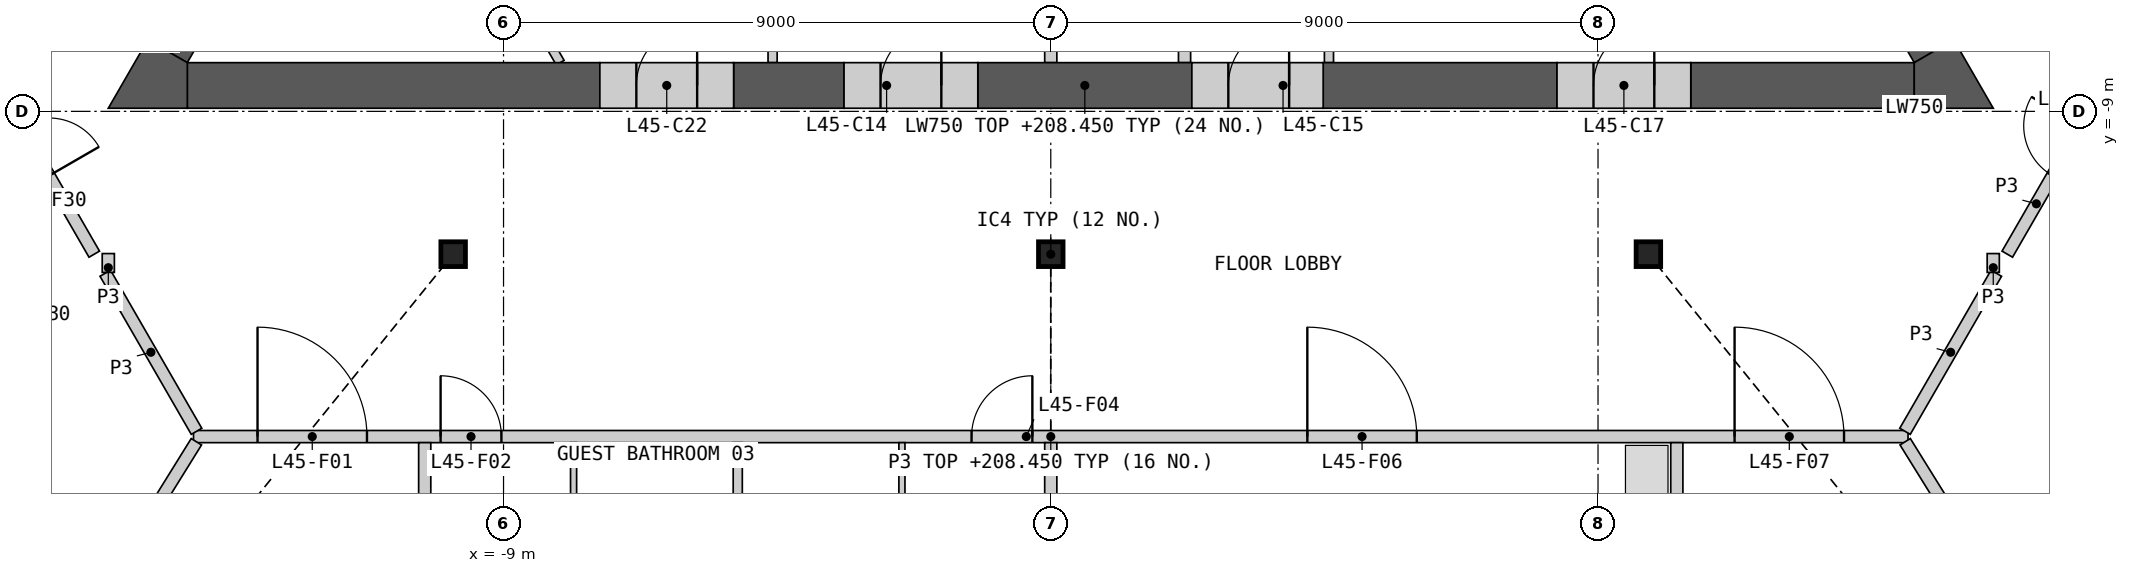
"""IFC4 building model, lengths in metres.
Left out: names, types, materials, properties, quantities, classifications, styles, units other than length and angle.
Written with IfcOpenShell. Run it as: python <this file> out.ifc"""

import sys

from ifc_helpers import new_model, si_unit, direction, frame, frame_2d, origin, origin_2d, place, context, subcontext, project, spatial, polyline, rectangle, i_section, outline, extrude, element, fill, save


model = new_model("IFC4")
c1 = context("Model", 3, precision=1e-05, world=origin(), true_north=direction((0.0, 1.0)))
c2 = subcontext(c1, "Body", "Model", "MODEL_VIEW")
j1 = project(units=[si_unit("LENGTHUNIT", "METRE"), si_unit("PLANEANGLEUNIT", "RADIAN")], contexts=[c1])
p1 = place(None, origin())
s1 = spatial("IfcSite", under=j1, at=p1, CompositionType="ELEMENT")
p2 = place(p1, origin())
s2 = spatial("IfcBuilding", under=s1, at=p2, CompositionType="ELEMENT")
p3 = place(p2, frame((0.0, 0.0, 205.2)))
s3 = spatial("IfcBuildingStorey", under=s2, at=p3, CompositionType="ELEMENT", Elevation=205.2)
for number, where, z_axis, x_axis in (
    (1, (-9.828, -11.349, 0.0), (0.0, 0.0, 1.0), (1.0, 0.0, 0.0)),
    (2, (0.0, -11.349, 0.0), (0.0, 0.0, 1.0), (1.0, 0.0, 0.0)),
    (3, (9.828, -11.349, 0.0), (0.0, 0.0, 1.0), (1.0, 0.0, 0.0)),
):
    element("IfcColumn", number, at=place(p3, frame(where, z_axis=z_axis, x_axis=x_axis)), inside=s3, PredefinedType="COLUMN", context=c2, shape_type="SweptSolid", body=[
        extrude(i_section(OverallWidth=0.404, OverallDepth=0.407, WebThickness=0.027, FlangeThickness=0.044, at=origin_2d()), origin(), (0.0, 0.0, 1.0), 3.6),
    ])
for number, where, z_axis, x_axis in (
    (4, (0.0, -6.906, 0.0), (0.0, 0.0, 1.0), (0.0, -1.0, 0.0)),
    (5, (2.2, -6.906, 0.0), (0.0, 0.0, 1.0), (0.0, -1.0, 0.0)),
):
    element("IfcWall", number, at=place(p3, frame(where, z_axis=z_axis, x_axis=x_axis)), inside=s3, PredefinedType="SHEAR", context=c2, shape_type="SweptSolid", body=[
        extrude(rectangle(XDim=1.293, YDim=0.2, at=frame_2d((0.646, 0.0))), origin(), (0.0, 0.0, 1.0), 3.25),
    ])
for number, where, z_axis, x_axis in (
    (6, (4.575, -6.906, 0.0), (0.0, 0.0, 1.0), (0.0, -1.0, 0.0)),
    (7, (-4.575, -6.906, 0.0), (0.0, 0.0, 1.0), (0.0, -1.0, 0.0)),
):
    element("IfcWall", number, at=place(p3, frame(where, z_axis=z_axis, x_axis=x_axis)), inside=s3, PredefinedType="PARTITIONING", context=c2, shape_type="SweptSolid", body=[
        extrude(rectangle(XDim=1.293, YDim=0.15, at=frame_2d((0.646, 0.0))), origin(), (0.0, 0.0, 1.0), 3.25),
    ])
p4 = place(p3, frame((-8.83, -6.881, 0.0), z_axis=(0.0, 0.0, 1.0), x_axis=(0.500037110984, -0.866003976688, 0.0)))
e8 = element("IfcWall", 8, at=p4, inside=s3, PredefinedType="PARTITIONING", context=c2, shape_type="SweptSolid", body=[
    extrude(rectangle(XDim=1.522, YDim=0.15, at=frame_2d((0.761, 0.0))), origin(), (0.0, 0.0, 1.0), 3.25),
])
p5 = place(p3, frame((-14.201, -8.574, 0.0), z_axis=(0.0, 0.0, 1.0), x_axis=(1.0, 0.0, 0.0)))
e9 = element("IfcWall", 9, at=p5, inside=s3, PredefinedType="SHEAR", context=c2, shape_type="SweptSolid", body=[
    extrude(rectangle(XDim=6.785, YDim=0.75, at=frame_2d((3.393, 0.0))), origin(), (0.0, 0.0, 1.0), 3.25),
])
p6 = place(p3, frame((4.48, -8.574, 0.0), z_axis=(0.0, 0.0, 1.0), x_axis=(1.0, 0.0, 0.0)))
e10 = element("IfcWall", 10, at=p6, inside=s3, PredefinedType="SHEAR", context=c2, shape_type="SweptSolid", body=[
    extrude(rectangle(XDim=3.845, YDim=0.75, at=frame_2d((1.923, 0.0))), origin(), (0.0, 0.0, 1.0), 3.25),
])
p7 = place(p3, frame((10.525, -8.574, 0.0), z_axis=(0.0, 0.0, 1.0), x_axis=(1.0, 0.0, 0.0)))
e11 = element("IfcWall", 11, at=p7, inside=s3, PredefinedType="SHEAR", context=c2, shape_type="SweptSolid", body=[
    extrude(rectangle(XDim=3.676, YDim=0.75, at=frame_2d((1.838, 0.0))), origin(), (0.0, 0.0, 1.0), 3.25),
])
p8 = place(p3, frame((-1.2, -8.574, 0.0), z_axis=(0.0, 0.0, 1.0), x_axis=(1.0, 0.0, 0.0)))
e12 = element("IfcWall", 12, at=p8, inside=s3, PredefinedType="SHEAR", context=c2, shape_type="SweptSolid", body=[
    extrude(rectangle(XDim=3.52, YDim=0.75, at=frame_2d((1.76, 0.0))), origin(), (0.0, 0.0, 1.0), 3.25),
])
p9 = place(p3, frame((-5.216, -8.574, 0.0), z_axis=(0.0, 0.0, 1.0), x_axis=(1.0, 0.0, 0.0)))
e13 = element("IfcWall", 13, at=p9, inside=s3, PredefinedType="SHEAR", context=c2, shape_type="SweptSolid", body=[
    extrude(rectangle(XDim=1.816, YDim=0.75, at=frame_2d((0.908, 0.0))), origin(), (0.0, 0.0, 1.0), 3.25),
])
p10 = place(p3, frame((14.526, -8.011, 0.0), z_axis=(0.0, 0.0, 1.0), x_axis=(-0.499996012963, 0.866027705689, 0.0)))
e14 = element("IfcWall", 14, at=p10, inside=s3, PredefinedType="SHEAR", context=c2, shape_type="SweptSolid", body=[
    extrude(rectangle(XDim=15.039, YDim=0.75, at=frame_2d((7.519, 0.0))), origin(), (0.0, 0.0, 1.0), 3.25),
])
p11 = place(p3, frame((-13.564, -6.346, 0.0), z_axis=(0.0, 0.0, 1.0), x_axis=(-0.499989888488, -0.86603124159, 0.0)))
e15 = element("IfcWall", 15, at=p11, inside=s3, PredefinedType="SHEAR", context=c2, shape_type="SweptSolid", body=[
    extrude(rectangle(XDim=1.923, YDim=0.75, at=frame_2d((0.961, 0.0))), origin(), (0.0, 0.0, 1.0), 3.25),
])
p12 = place(p3, origin())
e16 = element("IfcWall", 16, at=p12, inside=s3, PredefinedType="SHEAR", context=c2, shape_type="SweptSolid", body=[
    extrude(outline(polyline([(14.201, -8.949), (14.201, -8.199), (14.851, -7.824), (15.5, -8.949), (14.201, -8.949)])), origin(), (0.0, 0.0, 1.0), 3.25),
])
p13 = place(p3, origin())
e17 = element("IfcWall", 17, at=p13, inside=s3, PredefinedType="SHEAR", context=c2, shape_type="SweptSolid", body=[
    extrude(outline(polyline([(-14.851, -7.824), (-14.201, -8.199), (-14.201, -8.949), (-15.5, -8.949), (-14.851, -7.824)])), origin(), (0.0, 0.0, 1.0), 3.25),
])
p14 = place(p3, frame((-3.4, -8.574, 0.0), z_axis=(0.0, 0.0, 1.0), x_axis=(1.0, 0.0, 0.0)))
e18 = element("IfcWall", 18, at=p14, inside=s3, PredefinedType="SHEAR", context=c2, shape_type="SweptSolid", body=[
    extrude(rectangle(XDim=2.2, YDim=0.75, at=frame_2d((1.1, 0.0))), origin(), (0.0, 0.0, 1.0), 3.25),
])
p15 = place(p14, frame((0.6, 0.0, 0.0)))
e19 = element("IfcOpeningElement", 19, at=p15, cuts=e18, PredefinedType="OPENING", context=c2, shape_type="SweptSolid", body=[
    extrude(rectangle(XDim=1.0, YDim=2.1, at=frame_2d((0.5, 1.05))), frame((0.0, 0.385, 0.0), z_axis=(0.0, -1.0, 0.0), x_axis=(1.0, 0.0, 0.0)), (0.0, 0.0, 1.0), 0.77),
])
p16 = place(p3, frame((2.32, -8.574, 0.0), z_axis=(0.0, 0.0, 1.0), x_axis=(1.0, 0.0, 0.0)))
e20 = element("IfcWall", 20, at=p16, inside=s3, PredefinedType="SHEAR", context=c2, shape_type="SweptSolid", body=[
    extrude(rectangle(XDim=2.16, YDim=0.75, at=frame_2d((1.08, 0.0))), origin(), (0.0, 0.0, 1.0), 3.25),
])
p17 = place(p16, frame((0.6, 0.0, 0.0)))
e21 = element("IfcOpeningElement", 21, at=p17, cuts=e20, PredefinedType="OPENING", context=c2, shape_type="SweptSolid", body=[
    extrude(rectangle(XDim=1.0, YDim=2.1, at=frame_2d((0.5, 1.05))), frame((0.0, 0.385, 0.0), z_axis=(0.0, -1.0, 0.0), x_axis=(1.0, 0.0, 0.0)), (0.0, 0.0, 1.0), 0.77),
])
p18 = place(p3, frame((8.325, -8.574, 0.0), z_axis=(0.0, 0.0, 1.0), x_axis=(1.0, 0.0, 0.0)))
e22 = element("IfcWall", 22, at=p18, inside=s3, PredefinedType="SHEAR", context=c2, shape_type="SweptSolid", body=[
    extrude(rectangle(XDim=2.2, YDim=0.75, at=frame_2d((1.1, 0.0))), origin(), (0.0, 0.0, 1.0), 3.25),
])
p19 = place(p18, frame((0.6, 0.0, 0.0)))
e23 = element("IfcOpeningElement", 23, at=p19, cuts=e22, PredefinedType="OPENING", context=c2, shape_type="SweptSolid", body=[
    extrude(rectangle(XDim=1.0, YDim=2.1, at=frame_2d((0.5, 1.05))), frame((0.0, 0.385, 0.0), z_axis=(0.0, -1.0, 0.0), x_axis=(1.0, 0.0, 0.0)), (0.0, 0.0, 1.0), 0.77),
])
p20 = place(p3, frame((-7.416, -8.574, 0.0), z_axis=(0.0, 0.0, 1.0), x_axis=(1.0, 0.0, 0.0)))
e24 = element("IfcWall", 24, at=p20, inside=s3, PredefinedType="SHEAR", context=c2, shape_type="SweptSolid", body=[
    extrude(rectangle(XDim=2.2, YDim=0.75, at=frame_2d((1.1, 0.0))), origin(), (0.0, 0.0, 1.0), 3.25),
])
p21 = place(p20, frame((0.6, 0.0, 0.0)))
e25 = element("IfcOpeningElement", 25, at=p21, cuts=e24, PredefinedType="OPENING", context=c2, shape_type="SweptSolid", body=[
    extrude(rectangle(XDim=1.0, YDim=2.1, at=frame_2d((0.5, 1.05))), frame((0.0, 0.385, 0.0), z_axis=(0.0, -1.0, 0.0), x_axis=(1.0, 0.0, 0.0)), (0.0, 0.0, 1.0), 0.77),
])
p22 = place(p3, frame((-14.099, -14.349, 0.0), z_axis=(0.0, 0.0, 1.0), x_axis=(1.0, 0.0, 0.0)))
e26 = element("IfcWall", 26, at=p22, inside=s3, PredefinedType="PARTITIONING", context=c2, shape_type="SweptSolid", body=[
    extrude(rectangle(XDim=28.198, YDim=0.2, at=frame_2d((14.099, 0.0))), origin(), (0.0, 0.0, 1.0), 3.25),
])
p23 = place(p22, frame((1.053, 0.0, 0.0)))
e27 = element("IfcOpeningElement", 27, at=p23, cuts=e26, PredefinedType="OPENING", context=c2, shape_type="SweptSolid", body=[
    extrude(rectangle(XDim=1.8, YDim=2.1, at=frame_2d((0.9, 1.05))), frame((0.0, 0.11, 0.0), z_axis=(0.0, -1.0, 0.0), x_axis=(1.0, 0.0, 0.0)), (0.0, 0.0, 1.0), 0.22),
])
p24 = place(p22, frame((4.064, 0.0, 0.0)))
e28 = element("IfcOpeningElement", 28, at=p24, cuts=e26, PredefinedType="OPENING", context=c2, shape_type="SweptSolid", body=[
    extrude(rectangle(XDim=1.0, YDim=2.1, at=frame_2d((0.5, 1.05))), frame((0.0, 0.11, 0.0), z_axis=(0.0, -1.0, 0.0), x_axis=(1.0, 0.0, 0.0)), (0.0, 0.0, 1.0), 0.22),
])
p25 = place(p22, frame((12.796, 0.0, 0.0)))
e29 = element("IfcOpeningElement", 29, at=p25, cuts=e26, PredefinedType="OPENING", context=c2, shape_type="SweptSolid", body=[
    extrude(rectangle(XDim=1.0, YDim=2.1, at=frame_2d((0.5, 1.05))), frame((0.0, 0.11, 0.0), z_axis=(0.0, -1.0, 0.0), x_axis=(1.0, 0.0, 0.0)), (0.0, 0.0, 1.0), 0.22),
])
p26 = place(p22, frame((18.318, 0.0, 0.0)))
e30 = element("IfcOpeningElement", 30, at=p26, cuts=e26, PredefinedType="OPENING", context=c2, shape_type="SweptSolid", body=[
    extrude(rectangle(XDim=1.8, YDim=2.1, at=frame_2d((0.9, 1.05))), frame((0.0, 0.11, 0.0), z_axis=(0.0, -1.0, 0.0), x_axis=(1.0, 0.0, 0.0)), (0.0, 0.0, 1.0), 0.22),
])
p27 = place(p22, frame((25.345, 0.0, 0.0)))
e31 = element("IfcOpeningElement", 31, at=p27, cuts=e26, PredefinedType="OPENING", context=c2, shape_type="SweptSolid", body=[
    extrude(rectangle(XDim=1.8, YDim=2.1, at=frame_2d((0.9, 1.05))), frame((0.0, 0.11, 0.0), z_axis=(0.0, -1.0, 0.0), x_axis=(1.0, 0.0, 0.0)), (0.0, 0.0, 1.0), 0.22),
])
p28 = place(p3, frame((14.971, -3.233, 0.0), z_axis=(0.0, 0.0, 1.0), x_axis=(0.500003221507, -0.866023543838, 0.0)))
e32 = element("IfcWall", 32, at=p28, inside=s3, PredefinedType="PARTITIONING", context=c2, shape_type="SweptSolid", body=[
    extrude(rectangle(XDim=5.545, YDim=0.2, at=frame_2d((2.772, 0.0))), origin(), (0.0, 0.0, 1.0), 3.25),
])
p29 = place(p28, frame((4.094, 0.0, 0.0)))
e33 = element("IfcOpeningElement", 33, at=p29, cuts=e32, PredefinedType="OPENING", context=c2, shape_type="SweptSolid", body=[
    extrude(rectangle(XDim=1.1, YDim=2.1, at=frame_2d((0.55, 1.05))), frame((0.0, 0.11, 0.0), z_axis=(0.0, -1.0, 0.0), x_axis=(1.0, 0.0, 0.0)), (0.0, 0.0, 1.0), 0.22),
])
p30 = place(p3, frame((-17.744, -8.035, 0.0), z_axis=(0.0, 0.0, 1.0), x_axis=(0.500003221507, 0.866023543838, 0.0)))
e34 = element("IfcWall", 34, at=p30, inside=s3, PredefinedType="PARTITIONING", context=c2, shape_type="SweptSolid", body=[
    extrude(rectangle(XDim=5.545, YDim=0.2, at=frame_2d((2.772, 0.0))), origin(), (0.0, 0.0, 1.0), 3.25),
])
p31 = place(p30, frame((0.351, 0.0, 0.0)))
e35 = element("IfcOpeningElement", 35, at=p31, cuts=e34, PredefinedType="OPENING", context=c2, shape_type="SweptSolid", body=[
    extrude(rectangle(XDim=1.1, YDim=2.1, at=frame_2d((0.55, 1.05))), frame((0.0, 0.11, 0.0), z_axis=(0.0, -1.0, 0.0), x_axis=(1.0, 0.0, 0.0)), (0.0, 0.0, 1.0), 0.22),
])
p32 = place(p3, frame((15.731, -11.349, 0.0), z_axis=(0.0, 0.0, 1.0), x_axis=(0.499961815444, 0.866047448526, 0.0)))
e36 = element("IfcWall", 36, at=p32, inside=s3, PredefinedType="PARTITIONING", context=c2, shape_type="SweptSolid", body=[
    extrude(rectangle(XDim=3.826, YDim=0.2, at=frame_2d((1.913, 0.0))), origin(), (0.0, 0.0, 1.0), 3.25),
])
p33 = place(p32, frame((1.49, 0.0, 0.0)))
e37 = element("IfcOpeningElement", 37, at=p33, cuts=e36, PredefinedType="OPENING", context=c2, shape_type="SweptSolid", body=[
    extrude(rectangle(XDim=0.95, YDim=2.1, at=frame_2d((0.475, 1.05))), frame((0.0, 0.11, 0.0), z_axis=(0.0, -1.0, 0.0), x_axis=(1.0, 0.0, 0.0)), (0.0, 0.0, 1.0), 0.22),
])
p34 = place(p3, frame((-17.644, -8.035, 0.0), z_axis=(0.0, 0.0, 1.0), x_axis=(0.499961815444, -0.866047448526, 0.0)))
e38 = element("IfcWall", 38, at=p34, inside=s3, PredefinedType="PARTITIONING", context=c2, shape_type="SweptSolid", body=[
    extrude(rectangle(XDim=3.826, YDim=0.2, at=frame_2d((1.913, 0.0))), origin(), (0.0, 0.0, 1.0), 3.25),
])
p35 = place(p34, frame((1.386, 0.0, 0.0)))
e39 = element("IfcOpeningElement", 39, at=p35, cuts=e38, PredefinedType="OPENING", context=c2, shape_type="SweptSolid", body=[
    extrude(rectangle(XDim=0.95, YDim=2.1, at=frame_2d((0.475, 1.05))), frame((0.0, 0.11, 0.0), z_axis=(0.0, -1.0, 0.0), x_axis=(1.0, 0.0, 0.0)), (0.0, 0.0, 1.0), 0.22),
])
for number, where, z_axis, x_axis in (
    (40, (14.049, -14.262, 0.0), (0.0, 0.0, 1.0), (0.5, 0.866, 0.0)),
    (41, (-15.55, -11.662, 0.0), (0.0, 0.0, 1.0), (0.5, -0.866, 0.0)),
):
    element("IfcWall", number, at=place(p3, frame(where, z_axis=z_axis, x_axis=x_axis)), inside=s3, PredefinedType="PARTITIONING", context=c2, shape_type="SweptSolid", body=[
        extrude(rectangle(XDim=3.002, YDim=0.2, at=frame_2d((1.501, 0.0))), origin(), (0.0, 0.0, 1.0), 3.25),
    ])
for number, where, z_axis, x_axis in (
    (42, (-15.5, -11.649, 0.0), (0.0, 0.0, 1.0), (0.0, 1.0, 0.0)),
    (43, (15.5, -11.649, 0.0), (0.0, 0.0, 1.0), (0.0, 1.0, 0.0)),
):
    element("IfcWall", number, at=place(p3, frame(where, z_axis=z_axis, x_axis=x_axis)), inside=s3, PredefinedType="PARTITIONING", context=c2, shape_type="SweptSolid", body=[
        extrude(rectangle(XDim=0.31, YDim=0.2, at=frame_2d((0.155, 0.0))), origin(), (0.0, 0.0, 1.0), 3.25),
    ])
p36 = place(p3, frame((14.052, -14.434, 0.0), z_axis=(0.0, 0.0, 1.0), x_axis=(0.527581174538, -0.849504622868, 0.0)))
e44 = element("IfcWall", 44, at=p36, inside=s3, PredefinedType="PARTITIONING", context=c2, shape_type="SweptSolid", body=[
    extrude(rectangle(XDim=11.747, YDim=0.2, at=frame_2d((5.873, 0.0))), origin(), (0.0, 0.0, 1.0), 2.404),
])
p37 = place(p3, frame((-20.117, -24.2, 0.0), z_axis=(0.0, 0.0, 1.0), x_axis=(0.527576403825, 0.849507585679, 0.0)))
e45 = element("IfcWall", 45, at=p37, inside=s3, PredefinedType="PARTITIONING", context=c2, shape_type="SweptSolid", body=[
    extrude(rectangle(XDim=11.497, YDim=0.2, at=frame_2d((5.749, 0.0))), origin(), (0.0, 0.0, 1.0), 2.404),
])
for number, where, z_axis, x_axis in (
    (46, (-10.296, -24.312, 0.0), (0.0, 0.0, 1.0), (0.0, 1.0, 0.0)),
    (47, (0.0, -24.312, 0.0), (0.0, 0.0, 1.0), (0.0, 1.0, 0.0)),
    (48, (10.296, -24.312, 0.0), (0.0, 0.0, 1.0), (0.0, 1.0, 0.0)),
):
    element("IfcWall", number, at=place(p3, frame(where, z_axis=z_axis, x_axis=x_axis)), inside=s3, PredefinedType="PARTITIONING", context=c2, shape_type="SweptSolid", body=[
        extrude(rectangle(XDim=9.863, YDim=0.2, at=frame_2d((4.931, 0.0))), origin(), (0.0, 0.0, 1.0), 2.404),
    ])
p38 = place(p3, frame((-19.822, -11.562, 0.0), z_axis=(0.0, 0.0, 1.0), x_axis=(0.500008997517, -0.866020209003, 0.0)))
e49 = element("IfcWall", 49, at=p38, inside=s3, PredefinedType="PARTITIONING", context=c2, shape_type="SweptSolid", body=[
    extrude(rectangle(XDim=7.178, YDim=0.2, at=frame_2d((3.589, 0.0))), origin(), (0.0, 0.0, 1.0), 2.404),
])
p39 = place(p38, frame((2.059, 0.0, 0.0)))
e50 = element("IfcOpeningElement", 50, at=p39, cuts=e49, PredefinedType="OPENING", context=c2, shape_type="SweptSolid", body=[
    extrude(rectangle(XDim=0.95, YDim=2.1, at=frame_2d((0.475, 1.05))), frame((0.0, 0.11, 0.0), z_axis=(0.0, -1.0, 0.0), x_axis=(1.0, 0.0, 0.0)), (0.0, 0.0, 1.0), 0.22),
])
p40 = place(p3, frame((16.233, -17.779, 0.0), z_axis=(0.0, 0.0, 1.0), x_axis=(0.500008997517, 0.866020209003, 0.0)))
e51 = element("IfcWall", 51, at=p40, inside=s3, PredefinedType="PARTITIONING", context=c2, shape_type="SweptSolid", body=[
    extrude(rectangle(XDim=7.178, YDim=0.2, at=frame_2d((3.589, 0.0))), origin(), (0.0, 0.0, 1.0), 2.404),
])
p41 = place(p40, frame((4.973, 0.0, 0.0)))
e52 = element("IfcOpeningElement", 52, at=p41, cuts=e51, PredefinedType="OPENING", context=c2, shape_type="SweptSolid", body=[
    extrude(rectangle(XDim=0.95, YDim=2.1, at=frame_2d((0.475, 1.05))), frame((0.0, 0.11, 0.0), z_axis=(0.0, -1.0, 0.0), x_axis=(1.0, 0.0, 0.0)), (0.0, 0.0, 1.0), 0.22),
])
p42 = place(p3, frame((-5.148, -16.899, 0.0), z_axis=(0.0, 0.0, 1.0), x_axis=(0.0, 1.0, 0.0)))
e53 = element("IfcWall", 53, at=p42, inside=s3, PredefinedType="PLUMBINGWALL", context=c2, shape_type="SweptSolid", body=[
    extrude(rectangle(XDim=2.45, YDim=0.15, at=frame_2d((1.225, 0.0))), origin(), (0.0, 0.0, 1.0), 2.404),
])
for number, where, z_axis, x_axis in (
    (54, (-7.848, -16.899, 0.0), (0.0, 0.0, 1.0), (0.0, 1.0, 0.0)),
    (55, (-2.448, -16.899, 0.0), (0.0, 0.0, 1.0), (0.0, 1.0, 0.0)),
):
    element("IfcWall", number, at=place(p3, frame(where, z_axis=z_axis, x_axis=x_axis)), inside=s3, PredefinedType="PARTITIONING", context=c2, shape_type="SweptSolid", body=[
        extrude(rectangle(XDim=2.45, YDim=0.1, at=frame_2d((1.225, 0.0))), origin(), (0.0, 0.0, 1.0), 2.404),
    ])
p43 = place(p15, origin())
e56 = element("IfcDoor", 56, at=p43, inside=s3, OperationType="SINGLE_SWING_RIGHT", PredefinedType="DOOR", context=c2, shape_type="SweptSolid", body=[
    extrude(rectangle(XDim=1.0, YDim=2.1, at=frame_2d((0.5, 1.05))), frame((0.0, 0.13, 0.0), z_axis=(0.0, -1.0, 0.0), x_axis=(1.0, 0.0, 0.0)), (0.0, 0.0, 1.0), 0.05),
])
fill(e19, e56)
p44 = place(p17, origin())
e57 = element("IfcDoor", 57, at=p44, inside=s3, OperationType="SINGLE_SWING_RIGHT", PredefinedType="DOOR", context=c2, shape_type="SweptSolid", body=[
    extrude(rectangle(XDim=1.0, YDim=2.1, at=frame_2d((0.5, 1.05))), frame((0.0, 0.13, 0.0), z_axis=(0.0, -1.0, 0.0), x_axis=(1.0, 0.0, 0.0)), (0.0, 0.0, 1.0), 0.05),
])
fill(e21, e57)
p45 = place(p19, origin())
e58 = element("IfcDoor", 58, at=p45, inside=s3, OperationType="SINGLE_SWING_RIGHT", PredefinedType="DOOR", context=c2, shape_type="SweptSolid", body=[
    extrude(rectangle(XDim=1.0, YDim=2.1, at=frame_2d((0.5, 1.05))), frame((0.0, 0.13, 0.0), z_axis=(0.0, -1.0, 0.0), x_axis=(1.0, 0.0, 0.0)), (0.0, 0.0, 1.0), 0.05),
])
fill(e23, e58)
p46 = place(p21, origin())
e59 = element("IfcDoor", 59, at=p46, inside=s3, OperationType="SINGLE_SWING_RIGHT", PredefinedType="DOOR", context=c2, shape_type="SweptSolid", body=[
    extrude(rectangle(XDim=1.0, YDim=2.1, at=frame_2d((0.5, 1.05))), frame((0.0, 0.13, 0.0), z_axis=(0.0, -1.0, 0.0), x_axis=(1.0, 0.0, 0.0)), (0.0, 0.0, 1.0), 0.05),
])
fill(e25, e59)
p47 = place(p23, origin())
e60 = element("IfcDoor", 60, at=p47, inside=s3, OperationType="DOUBLE_DOOR_SINGLE_SWING", PredefinedType="DOOR", context=c2, shape_type="SweptSolid", body=[
    extrude(rectangle(XDim=1.8, YDim=2.1, at=frame_2d((0.9, 1.05))), frame((0.0, 0.025, 0.0), z_axis=(0.0, -1.0, 0.0), x_axis=(1.0, 0.0, 0.0)), (0.0, 0.0, 1.0), 0.05),
])
fill(e27, e60)
p48 = place(p24, origin())
e61 = element("IfcDoor", 61, at=p48, inside=s3, OperationType="SINGLE_SWING_LEFT", PredefinedType="DOOR", context=c2, shape_type="SweptSolid", body=[
    extrude(rectangle(XDim=1.0, YDim=2.1, at=frame_2d((0.5, 1.05))), frame((0.0, 0.025, 0.0), z_axis=(0.0, -1.0, 0.0), x_axis=(1.0, 0.0, 0.0)), (0.0, 0.0, 1.0), 0.05),
])
fill(e28, e61)
p49 = place(p25, origin())
e62 = element("IfcDoor", 62, at=p49, inside=s3, OperationType="SINGLE_SWING_RIGHT", PredefinedType="DOOR", context=c2, shape_type="SweptSolid", body=[
    extrude(rectangle(XDim=1.0, YDim=2.1, at=frame_2d((0.5, 1.05))), frame((0.0, 0.025, 0.0), z_axis=(0.0, -1.0, 0.0), x_axis=(1.0, 0.0, 0.0)), (0.0, 0.0, 1.0), 0.05),
])
fill(e29, e62)
p50 = place(p26, origin())
e63 = element("IfcDoor", 63, at=p50, inside=s3, OperationType="DOUBLE_DOOR_SINGLE_SWING", PredefinedType="DOOR", context=c2, shape_type="SweptSolid", body=[
    extrude(rectangle(XDim=1.8, YDim=2.1, at=frame_2d((0.9, 1.05))), frame((0.0, 0.025, 0.0), z_axis=(0.0, -1.0, 0.0), x_axis=(1.0, 0.0, 0.0)), (0.0, 0.0, 1.0), 0.05),
])
fill(e30, e63)
p51 = place(p27, origin())
e64 = element("IfcDoor", 64, at=p51, inside=s3, OperationType="DOUBLE_DOOR_SINGLE_SWING", PredefinedType="DOOR", context=c2, shape_type="SweptSolid", body=[
    extrude(rectangle(XDim=1.8, YDim=2.1, at=frame_2d((0.9, 1.05))), frame((0.0, 0.025, 0.0), z_axis=(0.0, -1.0, 0.0), x_axis=(1.0, 0.0, 0.0)), (0.0, 0.0, 1.0), 0.05),
])
fill(e31, e64)
save(model, sys.argv[1])
